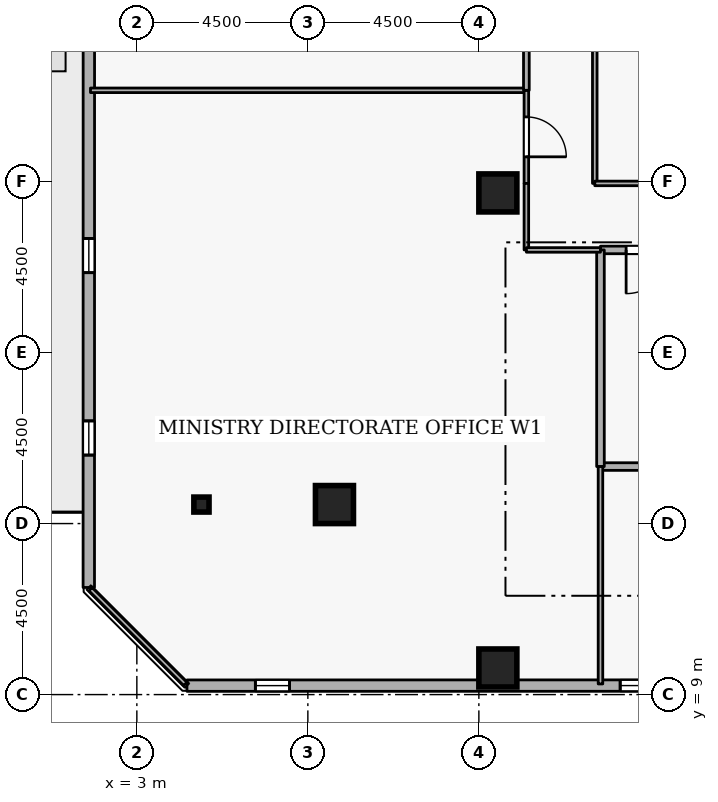
"""IFC4 building model, lengths in metres.
Left out: names, types, materials, properties, quantities, classifications, styles, units other than length and angle.
Written with IfcOpenShell. Run it as: python <this file> out.ifc"""

import sys

from ifc_helpers import new_model, si_unit, direction, frame, frame_2d, origin, origin_2d, place, context, subcontext, project, spatial, rectangle, i_section, extrude, element, fill, save


model = new_model("IFC4")
c1 = context("Model", 3, precision=1e-05, world=origin(), true_north=direction((0.0, 1.0)))
c2 = subcontext(c1, "Body", "Model", "MODEL_VIEW")
j1 = project(units=[si_unit("LENGTHUNIT", "METRE"), si_unit("PLANEANGLEUNIT", "RADIAN")], contexts=[c1])
p1 = place(None, origin())
s1 = spatial("IfcSite", under=j1, at=p1, CompositionType="ELEMENT")
p2 = place(p1, origin())
s2 = spatial("IfcBuilding", under=s1, at=p2, CompositionType="ELEMENT")
p3 = place(p2, frame((0.0, 0.0, 203.7)))
s3 = spatial("IfcBuildingStorey", under=s2, at=p3, CompositionType="ELEMENT", Elevation=203.7)
for number, where, z_axis, x_axis in (
    (1, (12.5, 9.7, 0.0), (0.0, 0.0, 1.0), (1.0, 0.0, 0.0)),
    (2, (8.2, 14.0, 0.0), (0.0, 0.0, 1.0), (1.0, 0.0, 0.0)),
    (3, (12.5, 22.2, 0.0), (0.0, 0.0, 1.0), (1.0, 0.0, 0.0)),
):
    element("IfcColumn", number, at=place(p3, frame(where, z_axis=z_axis, x_axis=x_axis)), inside=s3, PredefinedType="COLUMN", context=c2, shape_type="SweptSolid", body=[
        extrude(rectangle(XDim=1.0, YDim=1.0, at=origin_2d()), origin(), (0.0, 0.0, 1.0), 3.6),
    ])
p4 = place(p3, frame((4.7, 14.0, 0.0), z_axis=(0.0, 0.0, 1.0), x_axis=(1.0, 0.0, 0.0)))
e4 = element("IfcColumn", 4, at=p4, inside=s3, PredefinedType="COLUMN", context=c2, shape_type="SweptSolid", body=[
    extrude(i_section(OverallWidth=0.399, OverallDepth=0.394, WebThickness=0.023, FlangeThickness=0.037, FilletRadius=0.015, at=origin_2d()), origin(), (0.0, 0.0, 1.0), 3.6),
])
p5 = place(p3, frame((4.319, 9.235, 0.0), z_axis=(0.0, 0.0, 1.0), x_axis=(0.999999991209, 0.000132597301, 0.0)))
e5 = element("IfcWall", 5, at=p5, inside=s3, PredefinedType="STANDARD", context=c2, shape_type="SweptSolid", body=[
    extrude(rectangle(XDim=34.983, YDim=0.3, at=frame_2d((17.492, 0.0))), origin(), (0.0, 0.0, 1.0), 2.7),
])
p6 = place(p5, frame((1.8, 0.0, 0.72)))
e6 = element("IfcOpeningElement", 6, at=p6, cuts=e5, PredefinedType="OPENING", context=c2, shape_type="SweptSolid", body=[
    extrude(rectangle(XDim=0.9, YDim=1.75, at=frame_2d((0.45, 0.875))), frame((0.0, 0.16, 0.0), z_axis=(0.0, -1.0, 0.0), x_axis=(1.0, 0.0, 0.0)), (0.0, 0.0, 1.0), 0.32),
])
p7 = place(p5, frame((11.4, 0.0, 0.72)))
e7 = element("IfcOpeningElement", 7, at=p7, cuts=e5, PredefinedType="OPENING", context=c2, shape_type="SweptSolid", body=[
    extrude(rectangle(XDim=0.9, YDim=1.75, at=frame_2d((0.45, 0.875))), frame((0.0, 0.16, 0.0), z_axis=(0.0, -1.0, 0.0), x_axis=(1.0, 0.0, 0.0)), (0.0, 0.0, 1.0), 0.32),
])
p8 = place(p5, frame((16.2, 0.0, 0.72)))
e8 = element("IfcOpeningElement", 8, at=p8, cuts=e5, PredefinedType="OPENING", context=c2, shape_type="SweptSolid", body=[
    extrude(rectangle(XDim=0.9, YDim=1.75, at=frame_2d((0.45, 0.875))), frame((0.0, 0.16, 0.0), z_axis=(0.0, -1.0, 0.0), x_axis=(1.0, 0.0, 0.0)), (0.0, 0.0, 1.0), 0.32),
])
p9 = place(p5, frame((25.8, 0.0, 0.72)))
e9 = element("IfcOpeningElement", 9, at=p9, cuts=e5, PredefinedType="OPENING", context=c2, shape_type="SweptSolid", body=[
    extrude(rectangle(XDim=0.9, YDim=1.75, at=frame_2d((0.45, 0.875))), frame((0.0, 0.16, 0.0), z_axis=(0.0, -1.0, 0.0), x_axis=(1.0, 0.0, 0.0)), (0.0, 0.0, 1.0), 0.32),
])
p10 = place(p3, frame((1.74, 46.802, 0.0), z_axis=(0.0, 0.0, 1.0), x_axis=(-0.000132597301, -0.999999991209, 0.0)))
e10 = element("IfcWall", 10, at=p10, inside=s3, PredefinedType="STANDARD", context=c2, shape_type="SweptSolid", body=[
    extrude(rectangle(XDim=34.983, YDim=0.3, at=frame_2d((17.492, 0.0))), origin(), (0.0, 0.0, 1.0), 2.7),
])
p11 = place(p10, frame((19.292, 0.0, 0.0)))
e11 = element("IfcOpeningElement", 11, at=p11, cuts=e10, PredefinedType="OPENING", context=c2, shape_type="SweptSolid", body=[
    extrude(rectangle(XDim=1.0, YDim=2.08, at=frame_2d((0.5, 1.04))), frame((0.0, 0.16, 0.0), z_axis=(0.0, -1.0, 0.0), x_axis=(1.0, 0.0, 0.0)), (0.0, 0.0, 1.0), 0.32),
])
p12 = place(p10, frame((1.8, 0.0, 0.72)))
e12 = element("IfcOpeningElement", 12, at=p12, cuts=e10, PredefinedType="OPENING", context=c2, shape_type="SweptSolid", body=[
    extrude(rectangle(XDim=0.9, YDim=1.75, at=frame_2d((0.45, 0.875))), frame((0.0, 0.16, 0.0), z_axis=(0.0, -1.0, 0.0), x_axis=(1.0, 0.0, 0.0)), (0.0, 0.0, 1.0), 0.32),
])
p13 = place(p10, frame((6.6, 0.0, 0.72)))
e13 = element("IfcOpeningElement", 13, at=p13, cuts=e10, PredefinedType="OPENING", context=c2, shape_type="SweptSolid", body=[
    extrude(rectangle(XDim=0.9, YDim=1.75, at=frame_2d((0.45, 0.875))), frame((0.0, 0.16, 0.0), z_axis=(0.0, -1.0, 0.0), x_axis=(1.0, 0.0, 0.0)), (0.0, 0.0, 1.0), 0.32),
])
p14 = place(p10, frame((11.4, 0.0, 0.72)))
e14 = element("IfcOpeningElement", 14, at=p14, cuts=e10, PredefinedType="OPENING", context=c2, shape_type="SweptSolid", body=[
    extrude(rectangle(XDim=0.9, YDim=1.75, at=frame_2d((0.45, 0.875))), frame((0.0, 0.16, 0.0), z_axis=(0.0, -1.0, 0.0), x_axis=(1.0, 0.0, 0.0)), (0.0, 0.0, 1.0), 0.32),
])
p15 = place(p10, frame((16.2, 0.0, 0.72)))
e15 = element("IfcOpeningElement", 15, at=p15, cuts=e10, PredefinedType="OPENING", context=c2, shape_type="SweptSolid", body=[
    extrude(rectangle(XDim=0.9, YDim=1.75, at=frame_2d((0.45, 0.875))), frame((0.0, 0.16, 0.0), z_axis=(0.0, -1.0, 0.0), x_axis=(1.0, 0.0, 0.0)), (0.0, 0.0, 1.0), 0.32),
])
p16 = place(p10, frame((25.8, 0.0, 0.72)))
e16 = element("IfcOpeningElement", 16, at=p16, cuts=e10, PredefinedType="OPENING", context=c2, shape_type="SweptSolid", body=[
    extrude(rectangle(XDim=0.9, YDim=1.75, at=frame_2d((0.45, 0.875))), frame((0.0, 0.16, 0.0), z_axis=(0.0, -1.0, 0.0), x_axis=(1.0, 0.0, 0.0)), (0.0, 0.0, 1.0), 0.32),
])
p17 = place(p10, frame((30.6, 0.0, 0.72)))
e17 = element("IfcOpeningElement", 17, at=p17, cuts=e10, PredefinedType="OPENING", context=c2, shape_type="SweptSolid", body=[
    extrude(rectangle(XDim=0.9, YDim=1.75, at=frame_2d((0.45, 0.875))), frame((0.0, 0.16, 0.0), z_axis=(0.0, -1.0, 0.0), x_axis=(1.0, 0.0, 0.0)), (0.0, 0.0, 1.0), 0.32),
])
p18 = place(p3, frame((15.2, 15.0, 0.0), z_axis=(0.0, 0.0, 1.0), x_axis=(1.0, 0.0, 0.0)))
e18 = element("IfcWall", 18, at=p18, inside=s3, PredefinedType="STANDARD", context=c2, shape_type="SweptSolid", body=[
    extrude(rectangle(XDim=2.5, YDim=0.2, at=frame_2d((1.25, 0.0))), origin(), (0.0, 0.0, 1.0), 3.34),
])
p19 = place(p3, frame((17.7, 20.7, 0.0), z_axis=(0.0, 0.0, 1.0), x_axis=(-1.0, 0.0, 0.0)))
e19 = element("IfcWall", 19, at=p19, inside=s3, PredefinedType="STANDARD", context=c2, shape_type="SweptSolid", body=[
    extrude(rectangle(XDim=2.5, YDim=0.2, at=frame_2d((1.25, 0.0))), origin(), (0.0, 0.0, 1.0), 3.34),
])
p20 = place(p19, frame((0.675, 0.0, 0.0)))
e20 = element("IfcOpeningElement", 20, at=p20, cuts=e19, PredefinedType="OPENING", context=c2, shape_type="SweptSolid", body=[
    extrude(rectangle(XDim=1.15, YDim=2.1, at=frame_2d((0.575, 1.05))), frame((0.0, 0.11, 0.0), z_axis=(0.0, -1.0, 0.0), x_axis=(1.0, 0.0, 0.0)), (0.0, 0.0, 1.0), 0.22),
])
p21 = place(p3, frame((15.2, 20.7, 0.0), z_axis=(0.0, 0.0, 1.0), x_axis=(0.0, -1.0, 0.0)))
e21 = element("IfcWall", 21, at=p21, inside=s3, PredefinedType="STANDARD", context=c2, shape_type="SweptSolid", body=[
    extrude(rectangle(XDim=5.7, YDim=0.2, at=frame_2d((2.85, 0.0))), origin(), (0.0, 0.0, 1.0), 3.34),
])
p22 = place(p3, frame((1.78, 24.9, 0.0), z_axis=(0.0, 0.0, 1.0), x_axis=(1.0, 0.0, 0.0)))
e22 = element("IfcWall", 22, at=p22, inside=s3, PredefinedType="PARTITIONING", context=c2, shape_type="SweptSolid", body=[
    extrude(rectangle(XDim=11.47, YDim=0.12, at=frame_2d((5.735, 0.0))), origin(), (0.0, 0.0, 1.0), 3.34),
])
p23 = place(p3, frame((13.25, 24.9, 0.0), z_axis=(0.0, 0.0, 1.0), x_axis=(0.0, -1.0, 0.0)))
e23 = element("IfcWall", 23, at=p23, inside=s3, PredefinedType="PARTITIONING", context=c2, shape_type="SweptSolid", body=[
    extrude(rectangle(XDim=2.45, YDim=0.12, at=frame_2d((1.225, 0.0))), origin(), (0.0, 0.0, 1.0), 3.34),
])
p24 = place(p23, frame((0.7, 0.0, 0.0)))
e24 = element("IfcOpeningElement", 24, at=p24, cuts=e23, PredefinedType="OPENING", context=c2, shape_type="SweptSolid", body=[
    extrude(rectangle(XDim=1.05, YDim=2.1, at=frame_2d((0.525, 1.05))), frame((0.0, 0.07, 0.0), z_axis=(0.0, -1.0, 0.0), x_axis=(1.0, 0.0, 0.0)), (0.0, 0.0, 1.0), 0.14),
])
p25 = place(p3, frame((13.25, 22.45, 0.0), z_axis=(0.0, 0.0, 1.0), x_axis=(0.0, -1.0, 0.0)))
e25 = element("IfcWall", 25, at=p25, inside=s3, PredefinedType="PARTITIONING", context=c2, shape_type="SweptSolid", body=[
    extrude(rectangle(XDim=1.75, YDim=0.12, at=frame_2d((0.875, 0.0))), origin(), (0.0, 0.0, 1.0), 3.34),
])
p26 = place(p3, frame((13.25, 20.7, 0.0), z_axis=(0.0, 0.0, 1.0), x_axis=(1.0, 0.0, 0.0)))
e26 = element("IfcWall", 26, at=p26, inside=s3, PredefinedType="PARTITIONING", context=c2, shape_type="SweptSolid", body=[
    extrude(rectangle(XDim=1.95, YDim=0.12, at=frame_2d((0.975, 0.0))), origin(), (0.0, 0.0, 1.0), 3.34),
])
p27 = place(p3, frame((15.2, 15.0, 0.0), z_axis=(0.0, 0.0, 1.0), x_axis=(0.0, -1.0, 0.0)))
e27 = element("IfcWall", 27, at=p27, inside=s3, PredefinedType="PARTITIONING", context=c2, shape_type="SweptSolid", body=[
    extrude(rectangle(XDim=5.72, YDim=0.12, at=frame_2d((2.86, 0.0))), origin(), (0.0, 0.0, 1.0), 3.34),
])
p28 = place(p3, frame((4.275, 9.28, 0.0), z_axis=(0.0, 0.0, 1.0), x_axis=(-0.707106781187, 0.707106781187, 0.0)))
e28 = element("IfcWall", 28, at=p28, inside=s3, PredefinedType="PARTITIONING", context=c2, shape_type="SweptSolid", body=[
    extrude(rectangle(XDim=3.528, YDim=0.12, at=frame_2d((1.764, 0.0))), origin(), (0.0, 0.0, 1.0), 3.34),
])
p29 = place(p3, frame((13.25, 29.1, 0.0), z_axis=(0.0, 0.0, 1.0), x_axis=(0.0, -1.0, 0.0)))
e29 = element("IfcWall", 29, at=p29, inside=s3, PredefinedType="PARTITIONING", context=c2, shape_type="SweptSolid", body=[
    extrude(rectangle(XDim=4.2, YDim=0.15, at=frame_2d((2.1, 0.0))), origin(), (0.0, 0.0, 1.0), 3.34),
])
p30 = place(p29, frame((1.45, 0.0, 0.0)))
e30 = element("IfcOpeningElement", 30, at=p30, cuts=e29, PredefinedType="OPENING", context=c2, shape_type="SweptSolid", body=[
    extrude(rectangle(XDim=1.3, YDim=2.12, at=frame_2d((0.65, 1.06))), frame((0.0, 0.085, 0.0), z_axis=(0.0, -1.0, 0.0), x_axis=(1.0, 0.0, 0.0)), (0.0, 0.0, 1.0), 0.17),
])
p31 = place(p3, frame((15.05, 22.45, 0.0), z_axis=(0.0, 0.0, 1.0), x_axis=(0.0, 1.0, 0.0)))
e31 = element("IfcWall", 31, at=p31, inside=s3, PredefinedType="PARTITIONING", context=c2, shape_type="SweptSolid", body=[
    extrude(rectangle(XDim=9.1, YDim=0.12, at=frame_2d((4.55, 0.0))), origin(), (0.0, 0.0, 1.0), 3.34),
])
p32 = place(p31, frame((4.075, 0.0, 0.0)))
e32 = element("IfcOpeningElement", 32, at=p32, cuts=e31, PredefinedType="OPENING", context=c2, shape_type="SweptSolid", body=[
    extrude(rectangle(XDim=0.95, YDim=2.1, at=frame_2d((0.475, 1.05))), frame((0.0, 0.07, 0.0), z_axis=(0.0, -1.0, 0.0), x_axis=(1.0, 0.0, 0.0)), (0.0, 0.0, 1.0), 0.14),
])
p33 = place(p3, frame((20.9, 22.45, 0.0), z_axis=(0.0, 0.0, 1.0), x_axis=(-1.0, 0.0, 0.0)))
e33 = element("IfcWall", 33, at=p33, inside=s3, PredefinedType="PARTITIONING", context=c2, shape_type="SweptSolid", body=[
    extrude(rectangle(XDim=5.85, YDim=0.12, at=frame_2d((2.925, 0.0))), origin(), (0.0, 0.0, 1.0), 3.34),
])
p34 = place(p6, origin())
e34 = element("IfcWindow", 34, at=p34, inside=s3, PartitioningType="SINGLE_PANEL", PredefinedType="WINDOW", context=c2, shape_type="SweptSolid", body=[
    extrude(rectangle(XDim=0.9, YDim=1.75, at=frame_2d((0.45, 0.875))), frame((0.0, 0.03, 0.0), z_axis=(0.0, -1.0, 0.0), x_axis=(1.0, 0.0, 0.0)), (0.0, 0.0, 1.0), 0.06),
])
fill(e6, e34)
p35 = place(p7, origin())
e35 = element("IfcWindow", 35, at=p35, inside=s3, PartitioningType="SINGLE_PANEL", PredefinedType="WINDOW", context=c2, shape_type="SweptSolid", body=[
    extrude(rectangle(XDim=0.9, YDim=1.75, at=frame_2d((0.45, 0.875))), frame((0.0, 0.03, 0.0), z_axis=(0.0, -1.0, 0.0), x_axis=(1.0, 0.0, 0.0)), (0.0, 0.0, 1.0), 0.06),
])
fill(e7, e35)
p36 = place(p16, origin())
e36 = element("IfcWindow", 36, at=p36, inside=s3, PartitioningType="SINGLE_PANEL", PredefinedType="WINDOW", context=c2, shape_type="SweptSolid", body=[
    extrude(rectangle(XDim=0.9, YDim=1.75, at=frame_2d((0.45, 0.875))), frame((0.0, 0.03, 0.0), z_axis=(0.0, -1.0, 0.0), x_axis=(1.0, 0.0, 0.0)), (0.0, 0.0, 1.0), 0.06),
])
fill(e16, e36)
p37 = place(p17, origin())
e37 = element("IfcWindow", 37, at=p37, inside=s3, PartitioningType="SINGLE_PANEL", PredefinedType="WINDOW", context=c2, shape_type="SweptSolid", body=[
    extrude(rectangle(XDim=0.9, YDim=1.75, at=frame_2d((0.45, 0.875))), frame((0.0, 0.03, 0.0), z_axis=(0.0, -1.0, 0.0), x_axis=(1.0, 0.0, 0.0)), (0.0, 0.0, 1.0), 0.06),
])
fill(e17, e37)
p38 = place(p20, origin())
e38 = element("IfcDoor", 38, at=p38, inside=s3, OperationType="SINGLE_SWING_RIGHT", PredefinedType="DOOR", context=c2, shape_type="SweptSolid", body=[
    extrude(rectangle(XDim=1.15, YDim=2.1, at=frame_2d((0.575, 1.05))), frame((0.0, 0.025, 0.0), z_axis=(0.0, -1.0, 0.0), x_axis=(1.0, 0.0, 0.0)), (0.0, 0.0, 1.0), 0.05),
])
fill(e20, e38)
p39 = place(p24, origin())
e39 = element("IfcDoor", 39, at=p39, inside=s3, OperationType="SINGLE_SWING_RIGHT", PredefinedType="DOOR", context=c2, shape_type="SweptSolid", body=[
    extrude(rectangle(XDim=1.05, YDim=2.1, at=frame_2d((0.525, 1.05))), frame((0.0, 0.025, 0.0), z_axis=(0.0, -1.0, 0.0), x_axis=(1.0, 0.0, 0.0)), (0.0, 0.0, 1.0), 0.05),
])
fill(e24, e39)
save(model, sys.argv[1])
